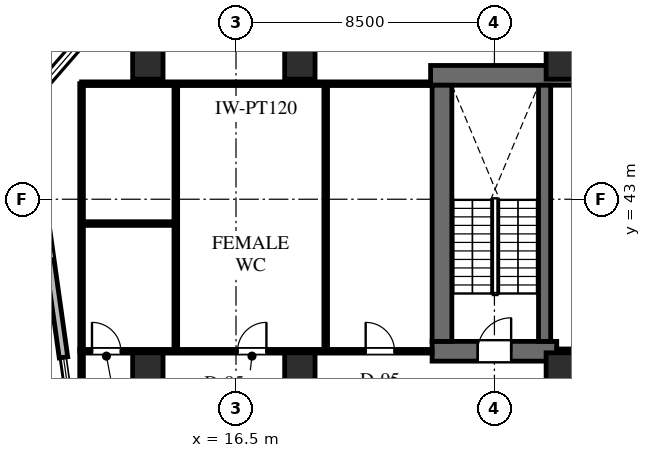
"""IFC4 building model, lengths in metres.
Left out: names, types, materials, properties, quantities, classifications, styles, units other than length and angle.
Written with IfcOpenShell. Run it as: python <this file> out.ifc"""

import sys

from ifc_helpers import new_model, si_unit, direction, frame, frame_2d, origin, origin_2d, place, context, subcontext, project, spatial, rectangle, extrude, element, fill, save


model = new_model("IFC4")
c1 = context("Model", 3, precision=1e-05, world=origin(), true_north=direction((0.0, 1.0)))
c2 = subcontext(c1, "Body", "Model", "MODEL_VIEW")
j1 = project(units=[si_unit("LENGTHUNIT", "METRE"), si_unit("PLANEANGLEUNIT", "RADIAN")], contexts=[c1])
p1 = place(None, origin())
s1 = spatial("IfcSite", under=j1, at=p1, CompositionType="ELEMENT")
p2 = place(p1, origin())
s2 = spatial("IfcBuilding", under=s1, at=p2, CompositionType="ELEMENT")
p3 = place(p2, frame((0.0, 0.0, 124.0)))
s3 = spatial("IfcBuildingStorey", under=s2, at=p3, CompositionType="ELEMENT", Elevation=124.0)
p4 = place(p3, frame((22.9, 47.075, 0.0), z_axis=(0.0, 0.0, 1.0), x_axis=(1.0, 0.0, 0.0)))
e1 = element("IfcWall", 1, at=p4, inside=s3, PredefinedType="SHEAR", context=c2, shape_type="SweptSolid", body=[
    extrude(rectangle(XDim=43.6, YDim=0.65, at=frame_2d((21.8, 0.0))), origin(), (0.0, 0.0, 1.0), 4.0),
])
p5 = place(p3, frame((22.95, 38.0, 0.0), z_axis=(0.0, 0.0, 1.0), x_axis=(1.0, 0.0, 0.0)))
e2 = element("IfcWall", 2, at=p5, inside=s3, PredefinedType="SHEAR", context=c2, shape_type="SweptSolid", body=[
    extrude(rectangle(XDim=4.1, YDim=0.65, at=frame_2d((2.05, 0.0))), origin(), (0.0, 0.0, 1.0), 4.0),
])
p6 = place(p5, frame((1.5, 0.0, 0.0)))
e3 = element("IfcOpeningElement", 3, at=p6, cuts=e2, PredefinedType="OPENING", context=c2, shape_type="SweptSolid", body=[
    extrude(rectangle(XDim=1.1, YDim=2.2, at=frame_2d((0.55, 1.1))), frame((0.0, 0.335, 0.0), z_axis=(0.0, -1.0, 0.0), x_axis=(1.0, 0.0, 0.0)), (0.0, 0.0, 1.0), 0.67),
])
p7 = place(p3, frame((23.275, 38.325, 0.0), z_axis=(0.0, 0.0, 1.0), x_axis=(0.0, 1.0, 0.0)))
e4 = element("IfcWall", 4, at=p7, inside=s3, PredefinedType="SHEAR", context=c2, shape_type="SweptSolid", body=[
    extrude(rectangle(XDim=8.425, YDim=0.65, at=frame_2d((4.212, 0.0))), origin(), (0.0, 0.0, 1.0), 4.0),
])
p8 = place(p3, frame((26.65, 38.325, 0.0), z_axis=(0.0, 0.0, 1.0), x_axis=(0.0, 1.0, 0.0)))
e5 = element("IfcWall", 5, at=p8, inside=s3, PredefinedType="SHEAR", context=c2, shape_type="SweptSolid", body=[
    extrude(rectangle(XDim=8.425, YDim=0.4, at=frame_2d((4.212, 0.0))), origin(), (0.0, 0.0, 1.0), 4.0),
])
for number, where, z_axis, x_axis in (
    (6, (27.2, 37.35, 0.0), (0.0, 0.0, 1.0), (1.0, 0.0, 0.0)),
    (7, (27.2, 47.55, 0.0), (0.0, 0.0, 1.0), (1.0, 0.0, 0.0)),
    (8, (18.6, 37.35, 0.0), (0.0, 0.0, 1.0), (1.0, 0.0, 0.0)),
    (9, (18.6, 47.55, 0.0), (0.0, 0.0, 1.0), (1.0, 0.0, 0.0)),
    (10, (13.6, 37.35, 0.0), (0.0, 0.0, 1.0), (1.0, 0.0, 0.0)),
    (11, (13.6, 47.55, 0.0), (0.0, 0.0, 1.0), (1.0, 0.0, 0.0)),
):
    element("IfcColumn", number, at=place(p3, frame(where, z_axis=z_axis, x_axis=x_axis)), inside=s3, PredefinedType="COLUMN", context=c2, shape_type="SweptSolid", body=[
        extrude(rectangle(XDim=1.0, YDim=1.2, at=origin_2d()), origin(), (0.0, 0.0, 1.0), 4.0),
    ])
p9 = place(p3, frame((10.825, 37.8, 0.0), z_axis=(0.0, 0.0, 1.0), x_axis=(-0.139180610108, 0.990267013371, 0.0)))
e12 = element("IfcWall", 12, at=p9, inside=s3, PredefinedType="STANDARD", context=c2, shape_type="SweptSolid", body=[
    extrude(rectangle(XDim=8.467, YDim=0.28, at=frame_2d((4.234, 0.0))), origin(), (0.0, 0.0, 1.0), 3.75),
])
p10 = place(p9, frame((3.273, 0.0, 0.65)))
e13 = element("IfcOpeningElement", 13, at=p10, cuts=e12, PredefinedType="OPENING", context=c2, shape_type="SweptSolid", body=[
    extrude(rectangle(XDim=1.8, YDim=2.1, at=frame_2d((0.9, 1.05))), frame((0.0, 0.15, 0.0), z_axis=(0.0, -1.0, 0.0), x_axis=(1.0, 0.0, 0.0)), (0.0, 0.0, 1.0), 0.3),
])
p11 = place(p3, frame((9.646, 46.185, 0.0), z_axis=(0.0, 0.0, 1.0), x_axis=(0.656070644076, 0.754699483226, 0.0)))
e14 = element("IfcWall", 14, at=p11, inside=s3, PredefinedType="STANDARD", context=c2, shape_type="SweptSolid", body=[
    extrude(rectangle(XDim=2.908, YDim=0.28, at=frame_2d((1.454, 0.0))), origin(), (0.0, 0.0, 1.0), 3.75),
])
p12 = place(p11, frame((0.541, 0.0, 0.65)))
e15 = element("IfcOpeningElement", 15, at=p12, cuts=e14, PredefinedType="OPENING", context=c2, shape_type="SweptSolid", body=[
    extrude(rectangle(XDim=1.8, YDim=2.1, at=frame_2d((0.9, 1.05))), frame((0.0, 0.15, 0.0), z_axis=(0.0, -1.0, 0.0), x_axis=(1.0, 0.0, 0.0)), (0.0, 0.0, 1.0), 0.3),
])
p13 = place(p3, frame((27.05, 38.0, 0.0), z_axis=(0.0, 0.0, 1.0), x_axis=(1.0, 0.0, 0.0)))
e16 = element("IfcWall", 16, at=p13, inside=s3, PredefinedType="PARTITIONING", context=c2, shape_type="SweptSolid", body=[
    extrude(rectangle(XDim=7.95, YDim=0.15, at=frame_2d((3.975, 0.0))), origin(), (0.0, 0.0, 1.0), 2.894),
])
p14 = place(p13, frame((1.7, 0.0, 0.0)))
e17 = element("IfcOpeningElement", 17, at=p14, cuts=e16, PredefinedType="OPENING", context=c2, shape_type="SweptSolid", body=[
    extrude(rectangle(XDim=0.9, YDim=2.1, at=frame_2d((0.45, 1.05))), frame((0.0, 0.085, 0.0), z_axis=(0.0, -1.0, 0.0), x_axis=(1.0, 0.0, 0.0)), (0.0, 0.0, 1.0), 0.17),
])
p15 = place(p13, frame((3.3, 0.0, 0.0)))
e18 = element("IfcOpeningElement", 18, at=p15, cuts=e16, PredefinedType="OPENING", context=c2, shape_type="SweptSolid", body=[
    extrude(rectangle(XDim=0.9, YDim=2.1, at=frame_2d((0.45, 1.05))), frame((0.0, 0.085, 0.0), z_axis=(0.0, -1.0, 0.0), x_axis=(1.0, 0.0, 0.0)), (0.0, 0.0, 1.0), 0.17),
])
p16 = place(p3, frame((11.42, 38.0, 0.0), z_axis=(0.0, 0.0, 1.0), x_axis=(1.0, 0.0, 0.0)))
e19 = element("IfcWall", 19, at=p16, inside=s3, PredefinedType="PARTITIONING", context=c2, shape_type="SweptSolid", body=[
    extrude(rectangle(XDim=11.53, YDim=0.12, at=frame_2d((5.765, 0.0))), origin(), (0.0, 0.0, 1.0), 2.894),
])
p17 = place(p16, frame((0.343, 0.0, 0.0)))
e20 = element("IfcOpeningElement", 20, at=p17, cuts=e19, PredefinedType="OPENING", context=c2, shape_type="SweptSolid", body=[
    extrude(rectangle(XDim=0.95, YDim=2.15, at=frame_2d((0.475, 1.075))), frame((0.0, 0.07, 0.0), z_axis=(0.0, -1.0, 0.0), x_axis=(1.0, 0.0, 0.0)), (0.0, 0.0, 1.0), 0.14),
])
p18 = place(p16, frame((5.13, 0.0, 0.0)))
e21 = element("IfcOpeningElement", 21, at=p18, cuts=e19, PredefinedType="OPENING", context=c2, shape_type="SweptSolid", body=[
    extrude(rectangle(XDim=0.95, YDim=2.15, at=frame_2d((0.475, 1.075))), frame((0.0, 0.07, 0.0), z_axis=(0.0, -1.0, 0.0), x_axis=(1.0, 0.0, 0.0)), (0.0, 0.0, 1.0), 0.14),
])
p19 = place(p16, frame((9.345, 0.0, 0.0)))
e22 = element("IfcOpeningElement", 22, at=p19, cuts=e19, PredefinedType="OPENING", context=c2, shape_type="SweptSolid", body=[
    extrude(rectangle(XDim=0.95, YDim=2.15, at=frame_2d((0.475, 1.075))), frame((0.0, 0.07, 0.0), z_axis=(0.0, -1.0, 0.0), x_axis=(1.0, 0.0, 0.0)), (0.0, 0.0, 1.0), 0.14),
])
p20 = place(p3, frame((11.42, 38.0, 0.0), z_axis=(0.0, 0.0, 1.0), x_axis=(0.0, 1.0, 0.0)))
e23 = element("IfcWall", 23, at=p20, inside=s3, PredefinedType="PARTITIONING", context=c2, shape_type="SweptSolid", body=[
    extrude(rectangle(XDim=8.8, YDim=0.12, at=frame_2d((4.4, 0.0))), origin(), (0.0, 0.0, 1.0), 3.75),
])
p21 = place(p3, frame((11.42, 46.8, 0.0), z_axis=(0.0, 0.0, 1.0), x_axis=(1.0, 0.0, 0.0)))
e24 = element("IfcWall", 24, at=p21, inside=s3, PredefinedType="PARTITIONING", context=c2, shape_type="SweptSolid", body=[
    extrude(rectangle(XDim=11.48, YDim=0.12, at=frame_2d((5.74, 0.0))), origin(), (0.0, 0.0, 1.0), 2.894),
])
for number, where, z_axis, x_axis in (
    (25, (14.52, 38.068, 0.0), (0.0, 0.0, 1.0), (0.0, 1.0, 0.0)),
    (26, (19.45, 38.068, 0.0), (0.0, 0.0, 1.0), (0.0, 1.0, 0.0)),
):
    element("IfcWall", number, at=place(p3, frame(where, z_axis=z_axis, x_axis=x_axis)), inside=s3, PredefinedType="PARTITIONING", context=c2, shape_type="SweptSolid", body=[
        extrude(rectangle(XDim=8.664, YDim=0.12, at=frame_2d((4.332, 0.0))), origin(), (0.0, 0.0, 1.0), 3.75),
    ])
p22 = place(p3, frame((11.488, 42.2, 0.0), z_axis=(0.0, 0.0, 1.0), x_axis=(1.0, 0.0, 0.0)))
e27 = element("IfcWall", 27, at=p22, inside=s3, PredefinedType="PARTITIONING", context=c2, shape_type="SweptSolid", body=[
    extrude(rectangle(XDim=2.964, YDim=0.12, at=frame_2d((1.482, 0.0))), origin(), (0.0, 0.0, 1.0), 2.894),
])
p23 = place(p3, frame((11.42, 34.4, 0.0), z_axis=(0.0, 0.0, 1.0), x_axis=(0.0, 1.0, 0.0)))
e28 = element("IfcWall", 28, at=p23, inside=s3, PredefinedType="PARTITIONING", context=c2, shape_type="SweptSolid", body=[
    extrude(rectangle(XDim=3.65, YDim=0.12, at=frame_2d((1.825, 0.0))), origin(), (0.0, 0.0, 1.0), 3.75),
])
p24 = place(p12, origin())
e29 = element("IfcWindow", 29, at=p24, inside=s3, PartitioningType="SINGLE_PANEL", PredefinedType="WINDOW", context=c2, shape_type="SweptSolid", body=[
    extrude(rectangle(XDim=1.8, YDim=2.1, at=frame_2d((0.9, 1.05))), frame((0.0, 0.03, 0.0), z_axis=(0.0, -1.0, 0.0), x_axis=(1.0, 0.0, 0.0)), (0.0, 0.0, 1.0), 0.06),
])
fill(e15, e29)
p25 = place(p6, origin())
e30 = element("IfcDoor", 30, at=p25, inside=s3, OperationType="SINGLE_SWING_RIGHT", PredefinedType="DOOR", context=c2, shape_type="SweptSolid", body=[
    extrude(rectangle(XDim=1.1, YDim=2.2, at=frame_2d((0.55, 1.1))), frame((0.0, 0.025, 0.0), z_axis=(0.0, -1.0, 0.0), x_axis=(1.0, 0.0, 0.0)), (0.0, 0.0, 1.0), 0.05),
])
fill(e3, e30)
p26 = place(p17, origin())
e31 = element("IfcDoor", 31, at=p26, inside=s3, OperationType="SINGLE_SWING_LEFT", PredefinedType="DOOR", context=c2, shape_type="SweptSolid", body=[
    extrude(rectangle(XDim=0.95, YDim=2.15, at=frame_2d((0.475, 1.075))), frame((0.0, 0.025, 0.0), z_axis=(0.0, -1.0, 0.0), x_axis=(1.0, 0.0, 0.0)), (0.0, 0.0, 1.0), 0.05),
])
fill(e20, e31)
p27 = place(p18, origin())
e32 = element("IfcDoor", 32, at=p27, inside=s3, OperationType="SINGLE_SWING_RIGHT", PredefinedType="DOOR", context=c2, shape_type="SweptSolid", body=[
    extrude(rectangle(XDim=0.95, YDim=2.15, at=frame_2d((0.475, 1.075))), frame((0.0, 0.025, 0.0), z_axis=(0.0, -1.0, 0.0), x_axis=(1.0, 0.0, 0.0)), (0.0, 0.0, 1.0), 0.05),
])
fill(e21, e32)
p28 = place(p19, origin())
e33 = element("IfcDoor", 33, at=p28, inside=s3, OperationType="SINGLE_SWING_LEFT", PredefinedType="DOOR", context=c2, shape_type="SweptSolid", body=[
    extrude(rectangle(XDim=0.95, YDim=2.15, at=frame_2d((0.475, 1.075))), frame((0.0, 0.025, 0.0), z_axis=(0.0, -1.0, 0.0), x_axis=(1.0, 0.0, 0.0)), (0.0, 0.0, 1.0), 0.05),
])
fill(e22, e33)
save(model, sys.argv[1])
